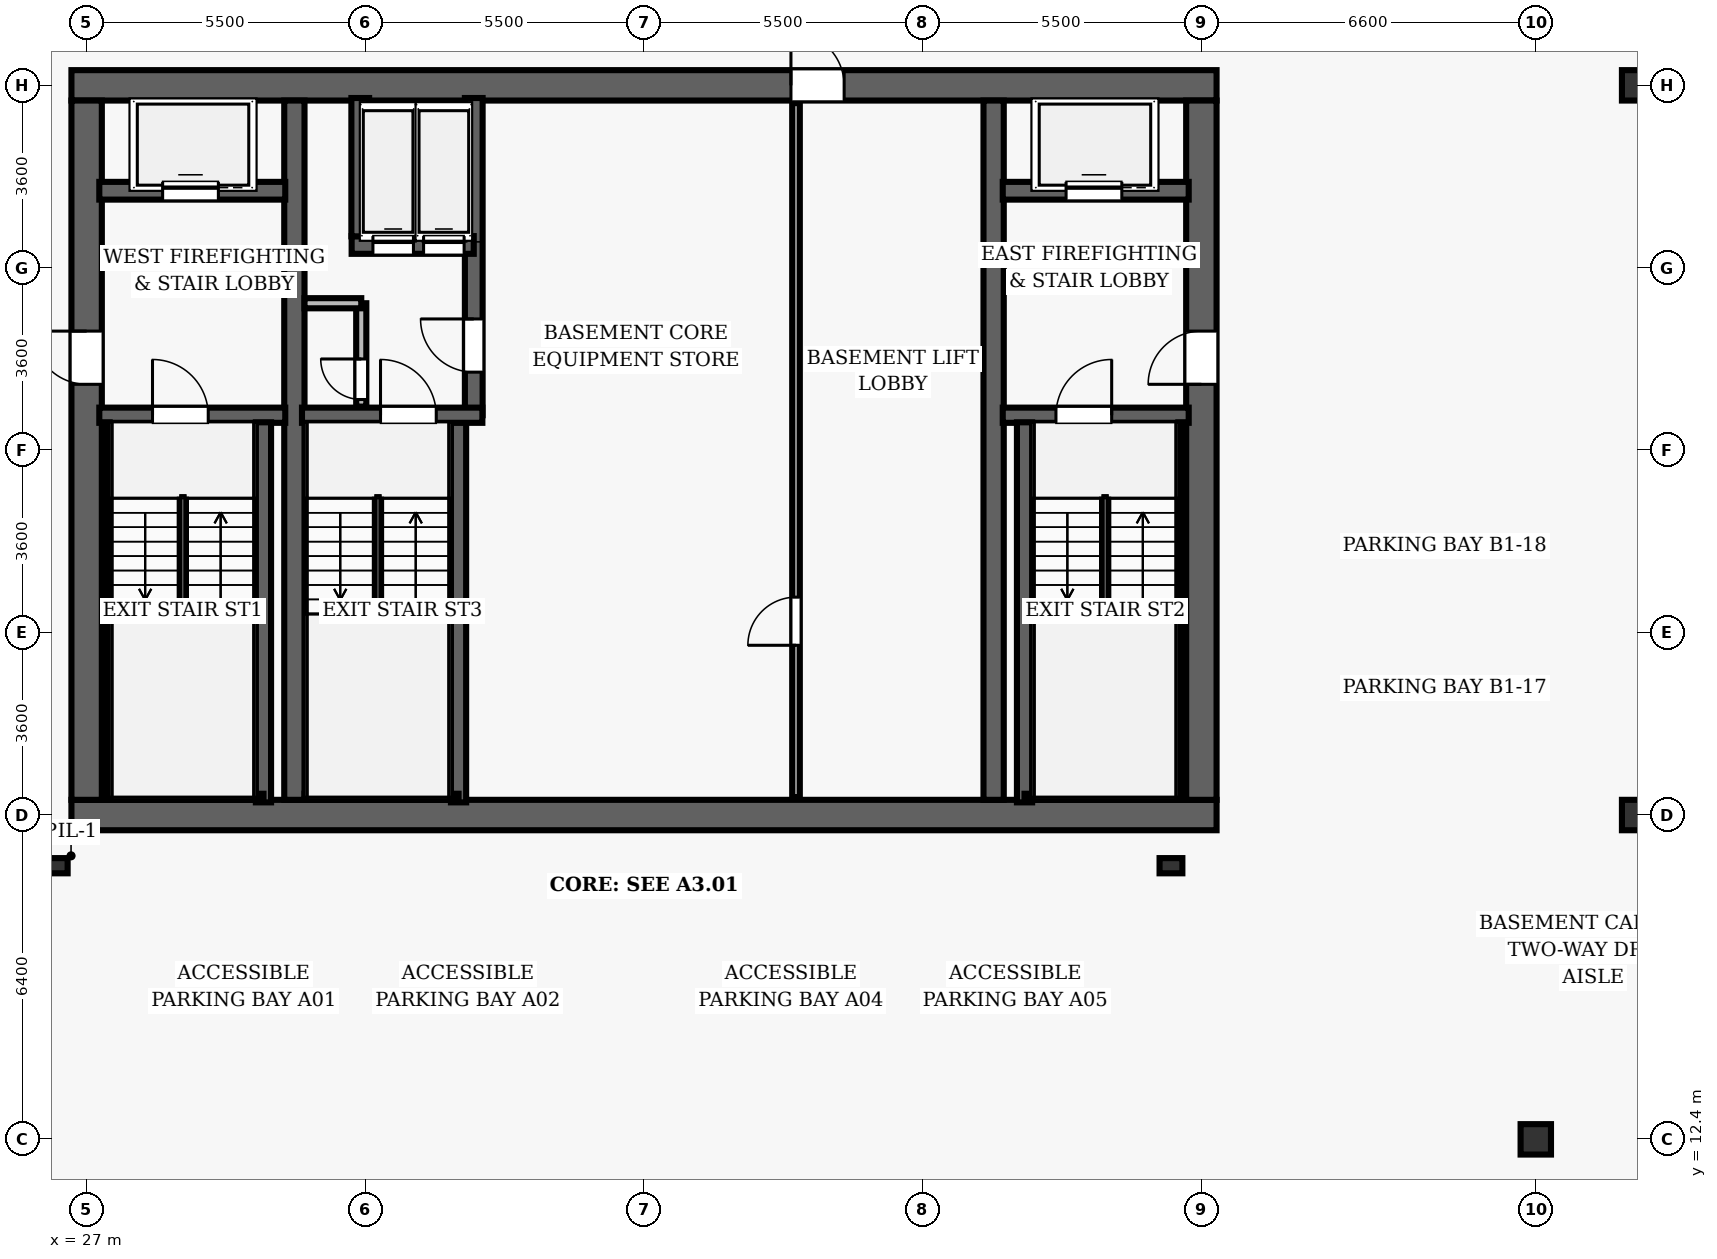
"""IFC4 building model, lengths in metres.
Left out: names, types, materials, properties, quantities, classifications, styles, units other than length and angle.
Written with IfcOpenShell. Run it as: python <this file> out.ifc"""

import sys

from ifc_helpers import new_model, si_unit, direction, frame, frame_2d, origin, origin_2d, place, context, subcontext, project, spatial, rectangle, extrude, element, fill, save


model = new_model("IFC4")
c1 = context("Model", 3, precision=1e-05, world=origin(), true_north=direction((0.0, 1.0)))
c2 = subcontext(c1, "Body", "Model", "MODEL_VIEW")
j1 = project(units=[si_unit("LENGTHUNIT", "METRE"), si_unit("PLANEANGLEUNIT", "RADIAN")], contexts=[c1])
p1 = place(None, origin())
s1 = spatial("IfcSite", under=j1, at=p1, CompositionType="ELEMENT")
p2 = place(p1, origin())
s2 = spatial("IfcBuilding", under=s1, at=p2, CompositionType="ELEMENT")
p3 = place(p2, frame((0.0, 0.0, -6.0)))
s3 = spatial("IfcBuildingStorey", under=s2, at=p3, CompositionType="ELEMENT", Elevation=-6.0)
p4 = place(p3, frame((26.7, 18.8, 0.0), z_axis=(0.0, 0.0, 1.0), x_axis=(1.0, 0.0, 0.0)))
e1 = element("IfcWall", 1, at=p4, inside=s3, PredefinedType="SHEAR", context=c2, shape_type="SweptSolid", body=[
    extrude(rectangle(XDim=22.6, YDim=0.6, at=frame_2d((11.3, 0.0))), origin(), (0.0, 0.0, 1.0), 6.0),
])
p5 = place(p3, frame((26.7, 33.2, 0.0), z_axis=(0.0, 0.0, 1.0), x_axis=(1.0, 0.0, 0.0)))
e2 = element("IfcWall", 2, at=p5, inside=s3, PredefinedType="SHEAR", context=c2, shape_type="SweptSolid", body=[
    extrude(rectangle(XDim=22.6, YDim=0.6, at=frame_2d((11.3, 0.0))), origin(), (0.0, 0.0, 1.0), 6.0),
])
p6 = place(p5, frame((14.2, 0.0, 0.0)))
e3 = element("IfcOpeningElement", 3, at=p6, cuts=e2, PredefinedType="OPENING", context=c2, shape_type="SweptSolid", body=[
    extrude(rectangle(XDim=1.05, YDim=2.15, at=frame_2d((0.525, 1.075))), frame((0.0, 0.31, 0.0), z_axis=(0.0, -1.0, 0.0), x_axis=(1.0, 0.0, 0.0)), (0.0, 0.0, 1.0), 0.62),
])
p7 = place(p3, frame((27.0, 19.1, 0.0), z_axis=(0.0, 0.0, 1.0), x_axis=(0.0, 1.0, 0.0)))
e4 = element("IfcWall", 4, at=p7, inside=s3, PredefinedType="SHEAR", context=c2, shape_type="SweptSolid", body=[
    extrude(rectangle(XDim=13.8, YDim=0.6, at=frame_2d((6.9, 0.0))), origin(), (0.0, 0.0, 1.0), 6.0),
])
p8 = place(p7, frame((8.2, 0.0, 0.0)))
e5 = element("IfcOpeningElement", 5, at=p8, cuts=e4, PredefinedType="OPENING", context=c2, shape_type="SweptSolid", body=[
    extrude(rectangle(XDim=1.05, YDim=2.15, at=frame_2d((0.525, 1.075))), frame((0.0, 0.31, 0.0), z_axis=(0.0, -1.0, 0.0), x_axis=(1.0, 0.0, 0.0)), (0.0, 0.0, 1.0), 0.62),
])
p9 = place(p3, frame((49.0, 19.1, 0.0), z_axis=(0.0, 0.0, 1.0), x_axis=(0.0, 1.0, 0.0)))
e6 = element("IfcWall", 6, at=p9, inside=s3, PredefinedType="SHEAR", context=c2, shape_type="SweptSolid", body=[
    extrude(rectangle(XDim=13.8, YDim=0.6, at=frame_2d((6.9, 0.0))), origin(), (0.0, 0.0, 1.0), 6.0),
])
p10 = place(p9, frame((8.2, 0.0, 0.0)))
e7 = element("IfcOpeningElement", 7, at=p10, cuts=e6, PredefinedType="OPENING", context=c2, shape_type="SweptSolid", body=[
    extrude(rectangle(XDim=1.05, YDim=2.15, at=frame_2d((0.525, 1.075))), frame((0.0, 0.31, 0.0), z_axis=(0.0, -1.0, 0.0), x_axis=(1.0, 0.0, 0.0)), (0.0, 0.0, 1.0), 0.62),
])
for number, where, z_axis, x_axis in (
    (8, (31.1, 19.1, 0.0), (0.0, 0.0, 1.0), (0.0, 1.0, 0.0)),
    (9, (44.9, 19.1, 0.0), (0.0, 0.0, 1.0), (0.0, 1.0, 0.0)),
):
    element("IfcWall", number, at=place(p3, frame(where, z_axis=z_axis, x_axis=x_axis)), inside=s3, PredefinedType="SHEAR", context=c2, shape_type="SweptSolid", body=[
        extrude(rectangle(XDim=13.8, YDim=0.4, at=frame_2d((6.9, 0.0))), origin(), (0.0, 0.0, 1.0), 6.0),
    ])
for number, where, z_axis, x_axis in (
    (10, (57.6, 18.8, -0.45), (0.0, 0.0, 1.0), (1.0, 0.0, 0.0)),
    (11, (57.6, 33.2, -0.45), (0.0, 0.0, 1.0), (1.0, 0.0, 0.0)),
    (12, (55.6, 12.4, -0.45), (0.0, 0.0, 1.0), (1.0, 0.0, 0.0)),
):
    element("IfcColumn", number, at=place(p3, frame(where, z_axis=z_axis, x_axis=x_axis)), inside=s3, PredefinedType="COLUMN", context=c2, shape_type="SweptSolid", body=[
        extrude(rectangle(XDim=0.6, YDim=0.6, at=origin_2d()), origin(), (0.0, 0.0, 1.0), 6.45),
    ])
p11 = place(p3, frame((27.25, 26.69, -0.45), z_axis=(0.0, 0.0, 1.0), x_axis=(1.0, 0.0, 0.0)))
e13 = element("IfcWall", 13, at=p11, inside=s3, PredefinedType="SHEAR", context=c2, shape_type="SweptSolid", body=[
    extrude(rectangle(XDim=3.67, YDim=0.3, at=frame_2d((1.835, 0.0))), origin(), (0.0, 0.0, 1.0), 6.45),
])
p12 = place(p11, frame((1.05, 0.0, 0.45)))
e14 = element("IfcOpeningElement", 14, at=p12, cuts=e13, PredefinedType="OPENING", context=c2, shape_type="SweptSolid", body=[
    extrude(rectangle(XDim=1.1, YDim=2.15, at=frame_2d((0.55, 1.075))), frame((0.0, 0.16, 0.0), z_axis=(0.0, -1.0, 0.0), x_axis=(1.0, 0.0, 0.0)), (0.0, 0.0, 1.0), 0.32),
])
p13 = place(p3, frame((30.49, 19.05, -0.45), z_axis=(0.0, 0.0, 1.0), x_axis=(0.0, 1.0, 0.0)))
e15 = element("IfcWall", 15, at=p13, inside=s3, PredefinedType="SHEAR", context=c2, shape_type="SweptSolid", body=[
    extrude(rectangle(XDim=7.5, YDim=0.3, at=frame_2d((3.75, 0.0))), origin(), (0.0, 0.0, 1.0), 6.45),
])
p14 = place(p3, frame((27.395, 19.1, -0.45), z_axis=(0.0, 0.0, 1.0), x_axis=(0.0, 1.0, 0.0)))
e16 = element("IfcWall", 16, at=p14, inside=s3, PredefinedType="SHEAR", context=c2, shape_type="SweptSolid", body=[
    extrude(rectangle(XDim=7.45, YDim=0.12, at=frame_2d((3.725, 0.0))), origin(), (0.0, 0.0, 1.0), 6.45),
])
p15 = place(p3, frame((27.395, 19.16, -0.45), z_axis=(0.0, 0.0, 1.0), x_axis=(1.0, 0.0, 0.0)))
e17 = element("IfcWall", 17, at=p15, inside=s3, PredefinedType="SHEAR", context=c2, shape_type="SweptSolid", body=[
    extrude(rectangle(XDim=3.095, YDim=0.12, at=frame_2d((1.547, 0.0))), origin(), (0.0, 0.0, 1.0), 6.45),
])
p16 = place(p3, frame((27.25, 31.12, 0.0), z_axis=(0.0, 0.0, 1.0), x_axis=(1.0, 0.0, 0.0)))
e18 = element("IfcWall", 18, at=p16, inside=s3, PredefinedType="SHEAR", context=c2, shape_type="SweptSolid", body=[
    extrude(rectangle(XDim=3.67, YDim=0.35, at=frame_2d((1.835, 0.0))), origin(), (0.0, 0.0, 1.0), 4.71),
])
p17 = place(p16, frame((1.25, 0.0, 0.0)))
e19 = element("IfcOpeningElement", 19, at=p17, cuts=e18, PredefinedType="OPENING", context=c2, shape_type="SweptSolid", body=[
    extrude(rectangle(XDim=1.1, YDim=2.15, at=frame_2d((0.55, 1.075))), frame((0.0, 0.185, 0.0), z_axis=(0.0, -1.0, 0.0), x_axis=(1.0, 0.0, 0.0)), (0.0, 0.0, 1.0), 0.37),
])
p18 = place(p3, frame((45.08, 26.69, -0.45), z_axis=(0.0, 0.0, 1.0), x_axis=(1.0, 0.0, 0.0)))
e20 = element("IfcWall", 20, at=p18, inside=s3, PredefinedType="SHEAR", context=c2, shape_type="SweptSolid", body=[
    extrude(rectangle(XDim=3.67, YDim=0.3, at=frame_2d((1.835, 0.0))), origin(), (0.0, 0.0, 1.0), 6.45),
])
p19 = place(p18, frame((1.05, 0.0, 0.45)))
e21 = element("IfcOpeningElement", 21, at=p19, cuts=e20, PredefinedType="OPENING", context=c2, shape_type="SweptSolid", body=[
    extrude(rectangle(XDim=1.1, YDim=2.15, at=frame_2d((0.55, 1.075))), frame((0.0, 0.16, 0.0), z_axis=(0.0, -1.0, 0.0), x_axis=(1.0, 0.0, 0.0)), (0.0, 0.0, 1.0), 0.32),
])
p20 = place(p3, frame((45.51, 19.05, -0.45), z_axis=(0.0, 0.0, 1.0), x_axis=(0.0, 1.0, 0.0)))
e22 = element("IfcWall", 22, at=p20, inside=s3, PredefinedType="SHEAR", context=c2, shape_type="SweptSolid", body=[
    extrude(rectangle(XDim=7.5, YDim=0.3, at=frame_2d((3.75, 0.0))), origin(), (0.0, 0.0, 1.0), 6.45),
])
p21 = place(p3, frame((48.605, 19.1, -0.45), z_axis=(0.0, 0.0, 1.0), x_axis=(0.0, 1.0, 0.0)))
e23 = element("IfcWall", 23, at=p21, inside=s3, PredefinedType="SHEAR", context=c2, shape_type="SweptSolid", body=[
    extrude(rectangle(XDim=7.45, YDim=0.12, at=frame_2d((3.725, 0.0))), origin(), (0.0, 0.0, 1.0), 6.45),
])
p22 = place(p3, frame((45.51, 19.16, -0.45), z_axis=(0.0, 0.0, 1.0), x_axis=(1.0, 0.0, 0.0)))
e24 = element("IfcWall", 24, at=p22, inside=s3, PredefinedType="SHEAR", context=c2, shape_type="SweptSolid", body=[
    extrude(rectangle(XDim=3.095, YDim=0.12, at=frame_2d((1.547, 0.0))), origin(), (0.0, 0.0, 1.0), 6.45),
])
p23 = place(p3, frame((45.08, 31.12, 0.0), z_axis=(0.0, 0.0, 1.0), x_axis=(1.0, 0.0, 0.0)))
e25 = element("IfcWall", 25, at=p23, inside=s3, PredefinedType="SHEAR", context=c2, shape_type="SweptSolid", body=[
    extrude(rectangle(XDim=3.67, YDim=0.35, at=frame_2d((1.835, 0.0))), origin(), (0.0, 0.0, 1.0), 4.71),
])
p24 = place(p23, frame((1.25, 0.0, 0.0)))
e26 = element("IfcOpeningElement", 26, at=p24, cuts=e25, PredefinedType="OPENING", context=c2, shape_type="SweptSolid", body=[
    extrude(rectangle(XDim=1.1, YDim=2.15, at=frame_2d((0.55, 1.075))), frame((0.0, 0.185, 0.0), z_axis=(0.0, -1.0, 0.0), x_axis=(1.0, 0.0, 0.0)), (0.0, 0.0, 1.0), 0.37),
])
p25 = place(p3, frame((34.34, 19.05, -0.45), z_axis=(0.0, 0.0, 1.0), x_axis=(0.0, 1.0, 0.0)))
e27 = element("IfcWall", 27, at=p25, inside=s3, PredefinedType="SHEAR", context=c2, shape_type="SweptSolid", body=[
    extrude(rectangle(XDim=7.5, YDim=0.3, at=frame_2d((3.75, 0.0))), origin(), (0.0, 0.0, 1.0), 6.45),
])
p26 = place(p3, frame((34.64, 26.69, -0.45), z_axis=(0.0, 0.0, 1.0), x_axis=(0.0, 1.0, 0.0)))
e28 = element("IfcWall", 28, at=p26, inside=s3, PredefinedType="SHEAR", context=c2, shape_type="SweptSolid", body=[
    extrude(rectangle(XDim=6.26, YDim=0.35, at=frame_2d((3.13, 0.0))), origin(), (0.0, 0.0, 1.0), 6.45),
])
p27 = place(p26, frame((0.85, 0.0, 0.45)))
e29 = element("IfcOpeningElement", 29, at=p27, cuts=e28, PredefinedType="OPENING", context=c2, shape_type="SweptSolid", body=[
    extrude(rectangle(XDim=1.05, YDim=2.15, at=frame_2d((0.525, 1.075))), frame((0.0, 0.185, 0.0), z_axis=(0.0, -1.0, 0.0), x_axis=(1.0, 0.0, 0.0)), (0.0, 0.0, 1.0), 0.37),
])
p28 = place(p3, frame((31.25, 26.69, -0.45), z_axis=(0.0, 0.0, 1.0), x_axis=(1.0, 0.0, 0.0)))
e30 = element("IfcWall", 30, at=p28, inside=s3, PredefinedType="SHEAR", context=c2, shape_type="SweptSolid", body=[
    extrude(rectangle(XDim=3.56, YDim=0.3, at=frame_2d((1.78, 0.0))), origin(), (0.0, 0.0, 1.0), 6.45),
])
p29 = place(p28, frame((1.55, 0.0, 0.45)))
e31 = element("IfcOpeningElement", 31, at=p29, cuts=e30, PredefinedType="OPENING", context=c2, shape_type="SweptSolid", body=[
    extrude(rectangle(XDim=1.1, YDim=2.15, at=frame_2d((0.55, 1.075))), frame((0.0, 0.16, 0.0), z_axis=(0.0, -1.0, 0.0), x_axis=(1.0, 0.0, 0.0)), (0.0, 0.0, 1.0), 0.32),
])
p30 = place(p3, frame((31.3, 19.16, -0.45), z_axis=(0.0, 0.0, 1.0), x_axis=(1.0, 0.0, 0.0)))
e32 = element("IfcWall", 32, at=p30, inside=s3, PredefinedType="SHEAR", context=c2, shape_type="SweptSolid", body=[
    extrude(rectangle(XDim=3.04, YDim=0.12, at=frame_2d((1.52, 0.0))), origin(), (0.0, 0.0, 1.0), 6.45),
])
p31 = place(p3, frame((32.23, 30.05, 0.0), z_axis=(0.0, 0.0, 1.0), x_axis=(1.0, 0.0, 0.0)))
e33 = element("IfcWall", 33, at=p31, inside=s3, PredefinedType="SHEAR", context=c2, shape_type="SweptSolid", body=[
    extrude(rectangle(XDim=2.41, YDim=0.35, at=frame_2d((1.205, 0.0))), origin(), (0.0, 0.0, 1.0), 4.71),
])
p32 = place(p31, frame((0.42, 0.0, 0.0)))
e34 = element("IfcOpeningElement", 34, at=p32, cuts=e33, PredefinedType="OPENING", context=c2, shape_type="SweptSolid", body=[
    extrude(rectangle(XDim=0.8, YDim=2.15, at=frame_2d((0.4, 1.075))), frame((0.0, 0.185, 0.0), z_axis=(0.0, -1.0, 0.0), x_axis=(1.0, 0.0, 0.0)), (0.0, 0.0, 1.0), 0.37),
])
p33 = place(p31, frame((1.42, 0.0, 0.0)))
e35 = element("IfcOpeningElement", 35, at=p33, cuts=e33, PredefinedType="OPENING", context=c2, shape_type="SweptSolid", body=[
    extrude(rectangle(XDim=0.8, YDim=2.15, at=frame_2d((0.4, 1.075))), frame((0.0, 0.185, 0.0), z_axis=(0.0, -1.0, 0.0), x_axis=(1.0, 0.0, 0.0)), (0.0, 0.0, 1.0), 0.37),
])
p34 = place(p3, frame((32.4, 30.22, 0.0), z_axis=(0.0, 0.0, 1.0), x_axis=(0.0, 1.0, 0.0)))
e36 = element("IfcWall", 36, at=p34, inside=s3, PredefinedType="SHEAR", context=c2, shape_type="SweptSolid", body=[
    extrude(rectangle(XDim=2.73, YDim=0.35, at=frame_2d((1.365, 0.0))), origin(), (0.0, 0.0, 1.0), 4.71),
])
p35 = place(p3, frame((32.42, 26.86, 0.0), z_axis=(0.0, 0.0, 1.0), x_axis=(0.0, 1.0, 0.0)))
e37 = element("IfcWall", 37, at=p35, inside=s3, PredefinedType="PARTITIONING", context=c2, shape_type="SweptSolid", body=[
    extrude(rectangle(XDim=2.04, YDim=0.2, at=frame_2d((1.02, 0.0))), origin(), (0.0, 0.0, 1.0), 4.71),
])
p36 = place(p35, frame((0.14, 0.0, 0.0)))
e38 = element("IfcOpeningElement", 38, at=p36, cuts=e37, PredefinedType="OPENING", context=c2, shape_type="SweptSolid", body=[
    extrude(rectangle(XDim=0.8, YDim=2.05, at=frame_2d((0.4, 1.025))), frame((0.0, 0.11, 0.0), z_axis=(0.0, -1.0, 0.0), x_axis=(1.0, 0.0, 0.0)), (0.0, 0.0, 1.0), 0.22),
])
p37 = place(p3, frame((31.3, 28.9, 0.0), z_axis=(0.0, 0.0, 1.0), x_axis=(1.0, 0.0, 0.0)))
e39 = element("IfcWall", 39, at=p37, inside=s3, PredefinedType="PARTITIONING", context=c2, shape_type="SweptSolid", body=[
    extrude(rectangle(XDim=1.12, YDim=0.2, at=frame_2d((0.56, 0.0))), origin(), (0.0, 0.0, 1.0), 4.71),
])
p38 = place(p3, frame((41.0, 19.15, 0.0), z_axis=(0.0, 0.0, 1.0), x_axis=(0.0, 1.0, 0.0)))
e40 = element("IfcWall", 40, at=p38, inside=s3, PredefinedType="PARTITIONING", context=c2, shape_type="SweptSolid", body=[
    extrude(rectangle(XDim=13.7, YDim=0.15, at=frame_2d((6.85, 0.0))), origin(), (0.0, 0.0, 1.0), 4.71),
])
p39 = place(p38, frame((3.0, 0.0, 0.0)))
e41 = element("IfcOpeningElement", 41, at=p39, cuts=e40, PredefinedType="OPENING", context=c2, shape_type="SweptSolid", body=[
    extrude(rectangle(XDim=0.95, YDim=2.15, at=frame_2d((0.475, 1.075))), frame((0.0, 0.085, 0.0), z_axis=(0.0, -1.0, 0.0), x_axis=(1.0, 0.0, 0.0)), (0.0, 0.0, 1.0), 0.17),
])
for number, where, z_axis, x_axis in (
    (42, (26.4, 17.8, -0.45), (0.0, 0.0, 1.0), (1.0, 0.0, 0.0)),
    (43, (48.4, 17.8, -0.45), (0.0, 0.0, 1.0), (1.0, 0.0, 0.0)),
):
    element("IfcColumn", number, at=place(p3, frame(where, z_axis=z_axis, x_axis=x_axis)), inside=s3, PredefinedType="PILASTER", context=c2, shape_type="SweptSolid", body=[
        extrude(rectangle(XDim=0.45, YDim=0.3, at=origin_2d()), origin(), (0.0, 0.0, 1.0), 6.45),
    ])
p40 = place(p12, origin())
e44 = element("IfcDoor", 44, at=p40, inside=s3, OperationType="SINGLE_SWING_LEFT", PredefinedType="DOOR", context=c2, shape_type="SweptSolid", body=[
    extrude(rectangle(XDim=1.1, YDim=2.15, at=frame_2d((0.55, 1.075))), frame((0.0, 0.025, 0.0), z_axis=(0.0, -1.0, 0.0), x_axis=(1.0, 0.0, 0.0)), (0.0, 0.0, 1.0), 0.05),
])
fill(e14, e44)
p41 = place(p8, origin())
e45 = element("IfcDoor", 45, at=p41, inside=s3, OperationType="SINGLE_SWING_RIGHT", PredefinedType="DOOR", context=c2, shape_type="SweptSolid", body=[
    extrude(rectangle(XDim=1.05, YDim=2.15, at=frame_2d((0.525, 1.075))), frame((0.0, 0.025, 0.0), z_axis=(0.0, -1.0, 0.0), x_axis=(1.0, 0.0, 0.0)), (0.0, 0.0, 1.0), 0.05),
])
fill(e5, e45)
p42 = place(p19, origin())
e46 = element("IfcDoor", 46, at=p42, inside=s3, OperationType="SINGLE_SWING_RIGHT", PredefinedType="DOOR", context=c2, shape_type="SweptSolid", body=[
    extrude(rectangle(XDim=1.1, YDim=2.15, at=frame_2d((0.55, 1.075))), frame((0.0, 0.025, 0.0), z_axis=(0.0, -1.0, 0.0), x_axis=(1.0, 0.0, 0.0)), (0.0, 0.0, 1.0), 0.05),
])
fill(e21, e46)
p43 = place(p10, origin())
e47 = element("IfcDoor", 47, at=p43, inside=s3, OperationType="SINGLE_SWING_LEFT", PredefinedType="DOOR", context=c2, shape_type="SweptSolid", body=[
    extrude(rectangle(XDim=1.05, YDim=2.15, at=frame_2d((0.525, 1.075))), frame((0.0, 0.025, 0.0), z_axis=(0.0, -1.0, 0.0), x_axis=(1.0, 0.0, 0.0)), (0.0, 0.0, 1.0), 0.05),
])
fill(e7, e47)
p44 = place(p29, origin())
e48 = element("IfcDoor", 48, at=p44, inside=s3, OperationType="SINGLE_SWING_LEFT", PredefinedType="DOOR", context=c2, shape_type="SweptSolid", body=[
    extrude(rectangle(XDim=1.1, YDim=2.15, at=frame_2d((0.55, 1.075))), frame((0.0, 0.025, 0.0), z_axis=(0.0, -1.0, 0.0), x_axis=(1.0, 0.0, 0.0)), (0.0, 0.0, 1.0), 0.05),
])
fill(e31, e48)
p45 = place(p36, origin())
e49 = element("IfcDoor", 49, at=p45, inside=s3, OperationType="SINGLE_SWING_RIGHT", PredefinedType="DOOR", context=c2, shape_type="SweptSolid", body=[
    extrude(rectangle(XDim=0.8, YDim=2.05, at=frame_2d((0.4, 1.025))), frame((0.0, 0.025, 0.0), z_axis=(0.0, -1.0, 0.0), x_axis=(1.0, 0.0, 0.0)), (0.0, 0.0, 1.0), 0.05),
])
fill(e38, e49)
p46 = place(p27, origin())
e50 = element("IfcDoor", 50, at=p46, inside=s3, OperationType="SINGLE_SWING_RIGHT", PredefinedType="DOOR", context=c2, shape_type="SweptSolid", body=[
    extrude(rectangle(XDim=1.05, YDim=2.15, at=frame_2d((0.525, 1.075))), frame((0.0, 0.025, 0.0), z_axis=(0.0, -1.0, 0.0), x_axis=(1.0, 0.0, 0.0)), (0.0, 0.0, 1.0), 0.05),
])
fill(e29, e50)
p47 = place(p39, origin())
e51 = element("IfcDoor", 51, at=p47, inside=s3, OperationType="SINGLE_SWING_LEFT", PredefinedType="DOOR", context=c2, shape_type="SweptSolid", body=[
    extrude(rectangle(XDim=0.95, YDim=2.15, at=frame_2d((0.475, 1.075))), frame((0.0, 0.025, 0.0), z_axis=(0.0, -1.0, 0.0), x_axis=(1.0, 0.0, 0.0)), (0.0, 0.0, 1.0), 0.05),
])
fill(e41, e51)
p48 = place(p6, origin())
e52 = element("IfcDoor", 52, at=p48, inside=s3, OperationType="SINGLE_SWING_LEFT", PredefinedType="DOOR", context=c2, shape_type="SweptSolid", body=[
    extrude(rectangle(XDim=1.05, YDim=2.15, at=frame_2d((0.525, 1.075))), frame((0.0, 0.025, 0.0), z_axis=(0.0, -1.0, 0.0), x_axis=(1.0, 0.0, 0.0)), (0.0, 0.0, 1.0), 0.05),
])
fill(e3, e52)
p49 = place(p17, origin())
e53 = element("IfcDoor", 53, at=p49, inside=s3, OperationType="SLIDING_TO_LEFT", PredefinedType="DOOR", context=c2, shape_type="SweptSolid", body=[
    extrude(rectangle(XDim=1.1, YDim=2.15, at=frame_2d((0.55, 1.075))), frame((0.0, 0.025, 0.0), z_axis=(0.0, -1.0, 0.0), x_axis=(1.0, 0.0, 0.0)), (0.0, 0.0, 1.0), 0.05),
])
fill(e19, e53)
p50 = place(p24, origin())
e54 = element("IfcDoor", 54, at=p50, inside=s3, OperationType="SLIDING_TO_LEFT", PredefinedType="DOOR", context=c2, shape_type="SweptSolid", body=[
    extrude(rectangle(XDim=1.1, YDim=2.15, at=frame_2d((0.55, 1.075))), frame((0.0, 0.025, 0.0), z_axis=(0.0, -1.0, 0.0), x_axis=(1.0, 0.0, 0.0)), (0.0, 0.0, 1.0), 0.05),
])
fill(e26, e54)
p51 = place(p32, origin())
e55 = element("IfcDoor", 55, at=p51, inside=s3, OperationType="SLIDING_TO_LEFT", PredefinedType="DOOR", context=c2, shape_type="SweptSolid", body=[
    extrude(rectangle(XDim=0.8, YDim=2.15, at=frame_2d((0.4, 1.075))), frame((0.0, 0.025, 0.0), z_axis=(0.0, -1.0, 0.0), x_axis=(1.0, 0.0, 0.0)), (0.0, 0.0, 1.0), 0.05),
])
fill(e34, e55)
p52 = place(p33, origin())
e56 = element("IfcDoor", 56, at=p52, inside=s3, OperationType="SLIDING_TO_LEFT", PredefinedType="DOOR", context=c2, shape_type="SweptSolid", body=[
    extrude(rectangle(XDim=0.8, YDim=2.15, at=frame_2d((0.4, 1.075))), frame((0.0, 0.025, 0.0), z_axis=(0.0, -1.0, 0.0), x_axis=(1.0, 0.0, 0.0)), (0.0, 0.0, 1.0), 0.05),
])
fill(e35, e56)
save(model, sys.argv[1])
